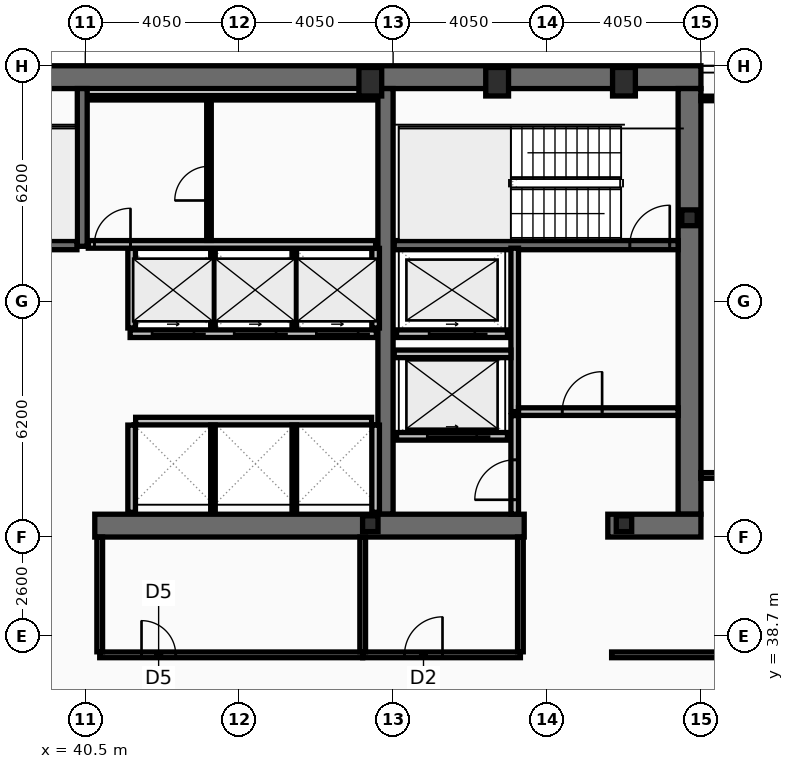
"""IFC4 building model, lengths in metres.
Left out: names, types, materials, properties, quantities, classifications, styles, units other than length and angle.
Written with IfcOpenShell. Run it as: python <this file> out.ifc"""

import sys

from ifc_helpers import new_model, si_unit, direction, frame, frame_2d, origin, origin_2d, place, context, subcontext, project, spatial, rectangle, hollow_rectangle, i_section, extrude, element, fill, save


model = new_model("IFC4")
c1 = context("Model", 3, precision=1e-05, world=origin(), true_north=direction((0.0, 1.0)))
c2 = subcontext(c1, "Body", "Model", "MODEL_VIEW")
j1 = project(units=[si_unit("LENGTHUNIT", "METRE"), si_unit("PLANEANGLEUNIT", "RADIAN")], contexts=[c1])
p1 = place(None, origin())
s1 = spatial("IfcSite", under=j1, at=p1, CompositionType="ELEMENT")
p2 = place(p1, origin())
s2 = spatial("IfcBuilding", under=s1, at=p2, CompositionType="ELEMENT")
p3 = place(p2, frame((0.0, 0.0, 224.6)))
s3 = spatial("IfcBuildingStorey", under=s2, at=p3, CompositionType="ELEMENT", Elevation=224.6)
p4 = place(p3, frame((16.2, 53.4, 0.0), z_axis=(0.0, 0.0, 1.0), x_axis=(1.0, 0.0, 0.0)))
e1 = element("IfcWall", 1, at=p4, inside=s3, PredefinedType="SHEAR", context=c2, shape_type="SweptSolid", body=[
    extrude(rectangle(XDim=40.5, YDim=0.6, at=frame_2d((20.25, 0.0))), origin(), (0.0, 0.0, 1.0), 3.44),
])
p5 = place(p3, frame((56.4, 53.1, 0.0), z_axis=(0.0, 0.0, 1.0), x_axis=(0.0, -1.0, 0.0)))
e2 = element("IfcWall", 2, at=p5, inside=s3, PredefinedType="SHEAR", context=c2, shape_type="SweptSolid", body=[
    extrude(rectangle(XDim=11.2, YDim=0.6, at=frame_2d((5.6, 0.0))), origin(), (0.0, 0.0, 1.0), 3.44),
])
p6 = place(p3, frame((48.4, 41.9, 0.0), z_axis=(0.0, 0.0, 1.0), x_axis=(0.0, 1.0, 0.0)))
e3 = element("IfcWall", 3, at=p6, inside=s3, PredefinedType="SHEAR", context=c2, shape_type="SweptSolid", body=[
    extrude(rectangle(XDim=11.2, YDim=0.4, at=frame_2d((5.6, 0.0))), origin(), (0.0, 0.0, 1.0), 3.44),
])
p7 = place(p3, frame((52.05, 41.6, 0.0), z_axis=(0.0, 0.0, 1.0), x_axis=(-1.0, 0.0, 0.0)))
e4 = element("IfcWall", 4, at=p7, inside=s3, PredefinedType="SHEAR", context=c2, shape_type="SweptSolid", body=[
    extrude(rectangle(XDim=11.3, YDim=0.6, at=frame_2d((5.65, 0.0))), origin(), (0.0, 0.0, 1.0), 3.44),
])
p8 = place(p3, frame((56.7, 41.6, 0.0), z_axis=(0.0, 0.0, 1.0), x_axis=(-1.0, 0.0, 0.0)))
e5 = element("IfcWall", 5, at=p8, inside=s3, PredefinedType="SHEAR", context=c2, shape_type="SweptSolid", body=[
    extrude(rectangle(XDim=2.45, YDim=0.6, at=frame_2d((1.225, 0.0))), origin(), (0.0, 0.0, 1.0), 3.44),
])
p9 = place(p3, frame((40.42, 48.95, 0.0), z_axis=(0.0, 0.0, 1.0), x_axis=(0.0, 1.0, 0.0)))
e6 = element("IfcWall", 6, at=p9, inside=s3, PredefinedType="SHEAR", context=c2, shape_type="SweptSolid", body=[
    extrude(rectangle(XDim=4.15, YDim=0.26, at=frame_2d((2.075, 0.0))), origin(), (0.0, 0.0, 1.0), 3.44),
])
p10 = place(p3, frame((48.63, 48.98, 0.0), z_axis=(0.0, 0.0, 1.0), x_axis=(1.0, 0.0, 0.0)))
e7 = element("IfcWall", 7, at=p10, inside=s3, PredefinedType="SHEAR", context=c2, shape_type="SweptSolid", body=[
    extrude(rectangle(XDim=7.47, YDim=0.24, at=frame_2d((3.735, 0.0))), origin(), (0.0, 0.0, 1.0), 3.44),
])
p11 = place(p10, frame((6.2, 0.0, 0.0)))
e8 = element("IfcOpeningElement", 8, at=p11, cuts=e7, PredefinedType="OPENING", context=c2, shape_type="SweptSolid", body=[
    extrude(rectangle(XDim=1.05, YDim=2.15, at=frame_2d((0.525, 1.075))), frame((0.0, 0.13, 0.0), z_axis=(0.0, -1.0, 0.0), x_axis=(1.0, 0.0, 0.0)), (0.0, 0.0, 1.0), 0.26),
])
p12 = place(p3, frame((32.72, 48.98, 0.0), z_axis=(0.0, 0.0, 1.0), x_axis=(1.0, 0.0, 0.0)))
e9 = element("IfcWall", 9, at=p12, inside=s3, PredefinedType="SHEAR", context=c2, shape_type="SweptSolid", body=[
    extrude(rectangle(XDim=7.56, YDim=0.24, at=frame_2d((3.78, 0.0))), origin(), (0.0, 0.0, 1.0), 3.44),
])
p13 = place(p12, frame((0.22, 0.0, 0.0)))
e10 = element("IfcOpeningElement", 10, at=p13, cuts=e9, PredefinedType="OPENING", context=c2, shape_type="SweptSolid", body=[
    extrude(rectangle(XDim=1.05, YDim=2.15, at=frame_2d((0.525, 1.075))), frame((0.0, 0.13, 0.0), z_axis=(0.0, -1.0, 0.0), x_axis=(1.0, 0.0, 0.0)), (0.0, 0.0, 1.0), 0.26),
])
for number, where, z_axis, x_axis in (
    (11, (48.0, 53.28, 0.0), (0.0, 0.0, 1.0), (1.0, 0.0, 0.0)),
    (12, (51.337, 53.28, 0.0), (0.0, 0.0, 1.0), (1.0, 0.0, 0.0)),
    (13, (54.675, 53.28, 0.0), (0.0, 0.0, 1.0), (1.0, 0.0, 0.0)),
):
    element("IfcColumn", number, at=place(p3, frame(where, z_axis=z_axis, x_axis=x_axis)), inside=s3, PredefinedType="COLUMN", context=c2, shape_type="SweptSolid", body=[
        extrude(hollow_rectangle(XDim=0.6, YDim=0.75, WallThickness=0.045, at=origin_2d()), origin(), (0.0, 0.0, 1.0), 3.6),
    ])
for number, where, z_axis, x_axis in (
    (14, (56.4, 49.7, 0.0), (0.0, 0.0, 1.0), (1.0, 0.0, 0.0)),
    (15, (48.0, 41.65, 0.0), (0.0, 0.0, 1.0), (1.0, 0.0, 0.0)),
    (16, (54.675, 41.65, 0.0), (0.0, 0.0, 1.0), (1.0, 0.0, 0.0)),
):
    element("IfcColumn", number, at=place(p3, frame(where, z_axis=z_axis, x_axis=x_axis)), inside=s3, PredefinedType="COLUMN", context=c2, shape_type="SweptSolid", body=[
        extrude(i_section(OverallWidth=0.406, OverallDepth=0.416, WebThickness=0.03, FlangeThickness=0.048, at=origin_2d()), origin(), (0.0, 0.0, 1.0), 3.6),
    ])
p14 = place(p3, frame((51.61, 43.95, 0.0), z_axis=(0.0, 0.0, 1.0), x_axis=(-1.0, 0.0, 0.0)))
e17 = element("IfcWall", 17, at=p14, inside=s3, PredefinedType="PARTITIONING", context=c2, shape_type="SweptSolid", body=[
    extrude(rectangle(XDim=2.92, YDim=0.2, at=frame_2d((1.46, 0.0))), origin(), (0.0, 0.0, 1.0), 3.44),
])
p15 = place(p14, frame((0.81, 0.0, 0.0)))
e18 = element("IfcOpeningElement", 18, at=p15, cuts=e17, PredefinedType="OPENING", context=c2, shape_type="SweptSolid", body=[
    extrude(rectangle(XDim=1.3, YDim=2.18, at=frame_2d((0.65, 1.09))), frame((0.0, 0.11, 0.0), z_axis=(0.0, -1.0, 0.0), x_axis=(1.0, 0.0, 0.0)), (0.0, 0.0, 1.0), 0.22),
])
p16 = place(p3, frame((51.61, 46.65, 0.0), z_axis=(0.0, 0.0, 1.0), x_axis=(-1.0, 0.0, 0.0)))
e19 = element("IfcWall", 19, at=p16, inside=s3, PredefinedType="PARTITIONING", context=c2, shape_type="SweptSolid", body=[
    extrude(rectangle(XDim=2.92, YDim=0.2, at=frame_2d((1.46, 0.0))), origin(), (0.0, 0.0, 1.0), 3.44),
])
p17 = place(p16, frame((0.86, 0.0, 0.0)))
e20 = element("IfcOpeningElement", 20, at=p17, cuts=e19, PredefinedType="OPENING", context=c2, shape_type="SweptSolid", body=[
    extrude(rectangle(XDim=1.2, YDim=2.18, at=frame_2d((0.6, 1.09))), frame((0.0, 0.11, 0.0), z_axis=(0.0, -1.0, 0.0), x_axis=(1.0, 0.0, 0.0)), (0.0, 0.0, 1.0), 0.22),
])
p18 = place(p3, frame((48.16, 46.65, 0.0), z_axis=(0.0, 0.0, 1.0), x_axis=(-1.0, 0.0, 0.0)))
e21 = element("IfcWall", 21, at=p18, inside=s3, PredefinedType="PARTITIONING", context=c2, shape_type="SweptSolid", body=[
    extrude(rectangle(XDim=6.48, YDim=0.2, at=frame_2d((3.24, 0.0))), origin(), (0.0, 0.0, 1.0), 3.44),
])
p19 = place(p18, frame((4.8, 0.0, 0.0)))
e22 = element("IfcOpeningElement", 22, at=p19, cuts=e21, PredefinedType="OPENING", context=c2, shape_type="SweptSolid", body=[
    extrude(rectangle(XDim=1.1, YDim=2.18, at=frame_2d((0.55, 1.09))), frame((0.0, 0.11, 0.0), z_axis=(0.0, -1.0, 0.0), x_axis=(1.0, 0.0, 0.0)), (0.0, 0.0, 1.0), 0.22),
])
p20 = place(p18, frame((2.64, 0.0, 0.0)))
e23 = element("IfcOpeningElement", 23, at=p20, cuts=e21, PredefinedType="OPENING", context=c2, shape_type="SweptSolid", body=[
    extrude(rectangle(XDim=1.1, YDim=2.18, at=frame_2d((0.55, 1.09))), frame((0.0, 0.11, 0.0), z_axis=(0.0, -1.0, 0.0), x_axis=(1.0, 0.0, 0.0)), (0.0, 0.0, 1.0), 0.22),
])
p21 = place(p18, frame((0.48, 0.0, 0.0)))
e24 = element("IfcOpeningElement", 24, at=p21, cuts=e21, PredefinedType="OPENING", context=c2, shape_type="SweptSolid", body=[
    extrude(rectangle(XDim=1.1, YDim=2.18, at=frame_2d((0.55, 1.09))), frame((0.0, 0.11, 0.0), z_axis=(0.0, -1.0, 0.0), x_axis=(1.0, 0.0, 0.0)), (0.0, 0.0, 1.0), 0.22),
])
p22 = place(p3, frame((51.8, 44.6, 0.0), z_axis=(0.0, 0.0, 1.0), x_axis=(0.0, 1.0, 0.0)))
e25 = element("IfcWall", 25, at=p22, inside=s3, PredefinedType="PARTITIONING", context=c2, shape_type="SweptSolid", body=[
    extrude(rectangle(XDim=4.3, YDim=0.2, at=frame_2d((2.15, 0.0))), origin(), (0.0, 0.0, 1.0), 3.44),
])
p23 = place(p3, frame((51.9, 44.6, 0.0), z_axis=(0.0, 0.0, 1.0), x_axis=(1.0, 0.0, 0.0)))
e26 = element("IfcWall", 26, at=p23, inside=s3, PredefinedType="PARTITIONING", context=c2, shape_type="SweptSolid", body=[
    extrude(rectangle(XDim=4.2, YDim=0.2, at=frame_2d((2.1, 0.0))), origin(), (0.0, 0.0, 1.0), 3.44),
])
p24 = place(p23, frame((1.15, 0.0, 0.0)))
e27 = element("IfcOpeningElement", 27, at=p24, cuts=e26, PredefinedType="OPENING", context=c2, shape_type="SweptSolid", body=[
    extrude(rectangle(XDim=1.05, YDim=2.15, at=frame_2d((0.525, 1.075))), frame((0.0, 0.11, 0.0), z_axis=(0.0, -1.0, 0.0), x_axis=(1.0, 0.0, 0.0)), (0.0, 0.0, 1.0), 0.22),
])
p25 = place(p3, frame((48.63, 46.12, 0.0), z_axis=(0.0, 0.0, 1.0), x_axis=(1.0, 0.0, 0.0)))
e28 = element("IfcWall", 28, at=p25, inside=s3, PredefinedType="PARTITIONING", context=c2, shape_type="SweptSolid", body=[
    extrude(rectangle(XDim=3.07, YDim=0.2, at=frame_2d((1.535, 0.0))), origin(), (0.0, 0.0, 1.0), 3.44),
])
p26 = place(p3, frame((51.8, 41.9, 0.0), z_axis=(0.0, 0.0, 1.0), x_axis=(0.0, 1.0, 0.0)))
e29 = element("IfcWall", 29, at=p26, inside=s3, PredefinedType="PARTITIONING", context=c2, shape_type="SweptSolid", body=[
    extrude(rectangle(XDim=2.595, YDim=0.2, at=frame_2d((1.298, 0.0))), origin(), (0.0, 0.0, 1.0), 3.44),
])
p27 = place(p26, frame((0.38, 0.0, 0.0)))
e30 = element("IfcOpeningElement", 30, at=p27, cuts=e29, PredefinedType="OPENING", context=c2, shape_type="SweptSolid", body=[
    extrude(rectangle(XDim=1.05, YDim=2.15, at=frame_2d((0.525, 1.075))), frame((0.0, 0.11, 0.0), z_axis=(0.0, -1.0, 0.0), x_axis=(1.0, 0.0, 0.0)), (0.0, 0.0, 1.0), 0.22),
])
for number, where, z_axis, x_axis in (
    (31, (41.72, 46.8, 0.0), (0.0, 0.0, 1.0), (0.0, 1.0, 0.0)),
    (32, (48.14, 46.8, 0.0), (0.0, 0.0, 1.0), (0.0, 1.0, 0.0)),
):
    element("IfcWall", number, at=place(p3, frame(where, z_axis=z_axis, x_axis=x_axis)), inside=s3, PredefinedType="PARTITIONING", context=c2, shape_type="SweptSolid", body=[
        extrude(rectangle(XDim=2.095, YDim=0.2, at=frame_2d((1.047, 0.0))), origin(), (0.0, 0.0, 1.0), 3.44),
    ])
for number, where, z_axis, x_axis in (
    (33, (43.86, 46.8, 0.0), (0.0, 0.0, 1.0), (0.0, 1.0, 0.0)),
    (34, (46.0, 46.8, 0.0), (0.0, 0.0, 1.0), (0.0, 1.0, 0.0)),
):
    element("IfcWall", number, at=place(p3, frame(where, z_axis=z_axis, x_axis=x_axis)), inside=s3, PredefinedType="PARTITIONING", context=c2, shape_type="SweptSolid", body=[
        extrude(rectangle(XDim=2.095, YDim=0.12, at=frame_2d((1.047, 0.0))), origin(), (0.0, 0.0, 1.0), 3.44),
    ])
p28 = place(p3, frame((41.825, 44.35, 0.0), z_axis=(0.0, 0.0, 1.0), x_axis=(1.0, 0.0, 0.0)))
e35 = element("IfcWall", 35, at=p28, inside=s3, PredefinedType="PARTITIONING", context=c2, shape_type="SweptSolid", body=[
    extrude(rectangle(XDim=6.21, YDim=0.2, at=frame_2d((3.105, 0.0))), origin(), (0.0, 0.0, 1.0), 3.44),
])
for number, where, z_axis, x_axis in (
    (36, (41.72, 41.95, 0.0), (0.0, 0.0, 1.0), (0.0, 1.0, 0.0)),
    (37, (48.14, 41.95, 0.0), (0.0, 0.0, 1.0), (0.0, 1.0, 0.0)),
):
    element("IfcWall", number, at=place(p3, frame(where, z_axis=z_axis, x_axis=x_axis)), inside=s3, PredefinedType="PARTITIONING", context=c2, shape_type="SweptSolid", body=[
        extrude(rectangle(XDim=2.295, YDim=0.2, at=frame_2d((1.147, 0.0))), origin(), (0.0, 0.0, 1.0), 3.44),
    ])
for number, where, z_axis, x_axis in (
    (38, (43.86, 41.95, 0.0), (0.0, 0.0, 1.0), (0.0, 1.0, 0.0)),
    (39, (46.0, 41.95, 0.0), (0.0, 0.0, 1.0), (0.0, 1.0, 0.0)),
):
    element("IfcWall", number, at=place(p3, frame(where, z_axis=z_axis, x_axis=x_axis)), inside=s3, PredefinedType="PARTITIONING", context=c2, shape_type="SweptSolid", body=[
        extrude(rectangle(XDim=2.295, YDim=0.12, at=frame_2d((1.147, 0.0))), origin(), (0.0, 0.0, 1.0), 3.44),
    ])
p29 = place(p3, frame((40.58, 52.86, 0.0), z_axis=(0.0, 0.0, 1.0), x_axis=(1.0, 0.0, 0.0)))
e40 = element("IfcWall", 40, at=p29, inside=s3, PredefinedType="PARTITIONING", context=c2, shape_type="SweptSolid", body=[
    extrude(rectangle(XDim=7.56, YDim=0.12, at=frame_2d((3.78, 0.0))), origin(), (0.0, 0.0, 1.0), 3.44),
])
p30 = place(p3, frame((40.58, 49.0, 0.0), z_axis=(0.0, 0.0, 1.0), x_axis=(1.0, 0.0, 0.0)))
e41 = element("IfcWall", 41, at=p30, inside=s3, PredefinedType="PARTITIONING", context=c2, shape_type="SweptSolid", body=[
    extrude(rectangle(XDim=7.56, YDim=0.2, at=frame_2d((3.78, 0.0))), origin(), (0.0, 0.0, 1.0), 3.44),
])
p31 = place(p30, frame((0.16, 0.0, 0.0)))
e42 = element("IfcOpeningElement", 42, at=p31, cuts=e41, PredefinedType="OPENING", context=c2, shape_type="SweptSolid", body=[
    extrude(rectangle(XDim=0.95, YDim=2.1, at=frame_2d((0.475, 1.05))), frame((0.0, 0.11, 0.0), z_axis=(0.0, -1.0, 0.0), x_axis=(1.0, 0.0, 0.0)), (0.0, 0.0, 1.0), 0.22),
])
p32 = place(p3, frame((43.755, 49.105, 0.0), z_axis=(0.0, 0.0, 1.0), x_axis=(0.0, 1.0, 0.0)))
e43 = element("IfcWall", 43, at=p32, inside=s3, PredefinedType="PARTITIONING", context=c2, shape_type="SweptSolid", body=[
    extrude(rectangle(XDim=3.69, YDim=0.12, at=frame_2d((1.845, 0.0))), origin(), (0.0, 0.0, 1.0), 3.44),
])
p33 = place(p32, frame((1.05, 0.0, 0.0)))
e44 = element("IfcOpeningElement", 44, at=p33, cuts=e43, PredefinedType="OPENING", context=c2, shape_type="SweptSolid", body=[
    extrude(rectangle(XDim=0.9, YDim=2.05, at=frame_2d((0.45, 1.025))), frame((0.0, 0.07, 0.0), z_axis=(0.0, -1.0, 0.0), x_axis=(1.0, 0.0, 0.0)), (0.0, 0.0, 1.0), 0.14),
])
p34 = place(p3, frame((40.88, 38.2, 0.0), z_axis=(0.0, 0.0, 1.0), x_axis=(1.0, 0.0, 0.0)))
e45 = element("IfcWall", 45, at=p34, inside=s3, PredefinedType="PARTITIONING", context=c2, shape_type="SweptSolid", body=[
    extrude(rectangle(XDim=6.92, YDim=0.15, at=frame_2d((3.46, 0.0))), origin(), (0.0, 0.0, 1.0), 2.78),
])
p35 = place(p34, frame((1.1, 0.0, 0.0)))
e46 = element("IfcOpeningElement", 46, at=p35, cuts=e45, PredefinedType="OPENING", context=c2, shape_type="SweptSolid", body=[
    extrude(rectangle(XDim=0.9, YDim=2.05, at=frame_2d((0.45, 1.025))), frame((0.0, 0.085, 0.0), z_axis=(0.0, -1.0, 0.0), x_axis=(1.0, 0.0, 0.0)), (0.0, 0.0, 1.0), 0.17),
])
p36 = place(p3, frame((47.8, 38.2, 0.0), z_axis=(0.0, 0.0, 1.0), x_axis=(1.0, 0.0, 0.0)))
e47 = element("IfcWall", 47, at=p36, inside=s3, PredefinedType="PARTITIONING", context=c2, shape_type="SweptSolid", body=[
    extrude(rectangle(XDim=4.15, YDim=0.15, at=frame_2d((2.075, 0.0))), origin(), (0.0, 0.0, 1.0), 2.78),
])
p37 = place(p36, frame((1.1, 0.0, 0.0)))
e48 = element("IfcOpeningElement", 48, at=p37, cuts=e47, PredefinedType="OPENING", context=c2, shape_type="SweptSolid", body=[
    extrude(rectangle(XDim=1.0, YDim=2.05, at=frame_2d((0.5, 1.025))), frame((0.0, 0.085, 0.0), z_axis=(0.0, -1.0, 0.0), x_axis=(1.0, 0.0, 0.0)), (0.0, 0.0, 1.0), 0.17),
])
p38 = place(p3, frame((40.88, 38.28, 0.0), z_axis=(0.0, 0.0, 1.0), x_axis=(0.0, 1.0, 0.0)))
e49 = element("IfcWall", 49, at=p38, inside=s3, PredefinedType="PARTITIONING", context=c2, shape_type="SweptSolid", body=[
    extrude(rectangle(XDim=3.02, YDim=0.15, at=frame_2d((1.51, 0.0))), origin(), (0.0, 0.0, 1.0), 3.44),
])
p39 = place(p3, frame((47.8, 38.28, 0.0), z_axis=(0.0, 0.0, 1.0), x_axis=(0.0, 1.0, 0.0)))
e50 = element("IfcWall", 50, at=p39, inside=s3, PredefinedType="PARTITIONING", context=c2, shape_type="SweptSolid", body=[
    extrude(rectangle(XDim=3.02, YDim=0.15, at=frame_2d((1.51, 0.0))), origin(), (0.0, 0.0, 1.0), 2.78),
])
p40 = place(p3, frame((51.95, 38.28, 0.0), z_axis=(0.0, 0.0, 1.0), x_axis=(0.0, 1.0, 0.0)))
e51 = element("IfcWall", 51, at=p40, inside=s3, PredefinedType="PARTITIONING", context=c2, shape_type="SweptSolid", body=[
    extrude(rectangle(XDim=3.02, YDim=0.15, at=frame_2d((1.51, 0.0))), origin(), (0.0, 0.0, 1.0), 3.44),
])
p41 = place(p3, frame((54.35, 38.2, 0.0), z_axis=(0.0, 0.0, 1.0), x_axis=(1.0, 0.0, 0.0)))
e52 = element("IfcWall", 52, at=p41, inside=s3, PredefinedType="PARTITIONING", context=c2, shape_type="SweptSolid", body=[
    extrude(rectangle(XDim=10.52, YDim=0.15, at=frame_2d((5.26, 0.0))), origin(), (0.0, 0.0, 1.0), 2.78),
])
p42 = place(p41, frame((3.25, 0.0, 0.0)))
e53 = element("IfcOpeningElement", 53, at=p42, cuts=e52, PredefinedType="OPENING", context=c2, shape_type="SweptSolid", body=[
    extrude(rectangle(XDim=0.95, YDim=2.05, at=frame_2d((0.475, 1.025))), frame((0.0, 0.085, 0.0), z_axis=(0.0, -1.0, 0.0), x_axis=(1.0, 0.0, 0.0)), (0.0, 0.0, 1.0), 0.17),
])
p43 = place(p3, frame((56.7, 42.92, 0.0), z_axis=(0.0, 0.0, 1.0), x_axis=(1.0, 0.0, 0.0)))
e54 = element("IfcWall", 54, at=p43, inside=s3, PredefinedType="PARTITIONING", context=c2, shape_type="SweptSolid", body=[
    extrude(rectangle(XDim=8.105, YDim=0.15, at=frame_2d((4.052, 0.0))), origin(), (0.0, 0.0, 1.0), 2.78),
])
p44 = place(p43, frame((0.9, 0.0, 0.0)))
e55 = element("IfcOpeningElement", 55, at=p44, cuts=e54, PredefinedType="OPENING", context=c2, shape_type="SweptSolid", body=[
    extrude(rectangle(XDim=0.9, YDim=2.05, at=frame_2d((0.45, 1.025))), frame((0.0, 0.085, 0.0), z_axis=(0.0, -1.0, 0.0), x_axis=(1.0, 0.0, 0.0)), (0.0, 0.0, 1.0), 0.17),
])
p45 = place(p3, frame((56.7, 52.84, 0.0), z_axis=(0.0, 0.0, 1.0), x_axis=(1.0, 0.0, 0.0)))
e56 = element("IfcWall", 56, at=p45, inside=s3, PredefinedType="PARTITIONING", context=c2, shape_type="SweptSolid", body=[
    extrude(rectangle(XDim=8.105, YDim=0.12, at=frame_2d((4.052, 0.0))), origin(), (0.0, 0.0, 1.0), 3.44),
])
p46 = place(p11, origin())
e57 = element("IfcDoor", 57, at=p46, inside=s3, OperationType="SINGLE_SWING_RIGHT", PredefinedType="DOOR", context=c2, shape_type="SweptSolid", body=[
    extrude(rectangle(XDim=1.05, YDim=2.15, at=frame_2d((0.525, 1.075))), frame((0.0, 0.025, 0.0), z_axis=(0.0, -1.0, 0.0), x_axis=(1.0, 0.0, 0.0)), (0.0, 0.0, 1.0), 0.05),
])
fill(e8, e57)
p47 = place(p15, origin())
e58 = element("IfcDoor", 58, at=p47, inside=s3, OperationType="SLIDING_TO_LEFT", PredefinedType="DOOR", context=c2, shape_type="SweptSolid", body=[
    extrude(rectangle(XDim=1.3, YDim=2.18, at=frame_2d((0.65, 1.09))), frame((0.0, 0.025, 0.0), z_axis=(0.0, -1.0, 0.0), x_axis=(1.0, 0.0, 0.0)), (0.0, 0.0, 1.0), 0.05),
])
fill(e18, e58)
p48 = place(p17, origin())
e59 = element("IfcDoor", 59, at=p48, inside=s3, OperationType="SLIDING_TO_LEFT", PredefinedType="DOOR", context=c2, shape_type="SweptSolid", body=[
    extrude(rectangle(XDim=1.2, YDim=2.18, at=frame_2d((0.6, 1.09))), frame((0.0, 0.025, 0.0), z_axis=(0.0, -1.0, 0.0), x_axis=(1.0, 0.0, 0.0)), (0.0, 0.0, 1.0), 0.05),
])
fill(e20, e59)
p49 = place(p19, origin())
e60 = element("IfcDoor", 60, at=p49, inside=s3, OperationType="SLIDING_TO_LEFT", PredefinedType="DOOR", context=c2, shape_type="SweptSolid", body=[
    extrude(rectangle(XDim=1.1, YDim=2.18, at=frame_2d((0.55, 1.09))), frame((0.0, 0.025, 0.0), z_axis=(0.0, -1.0, 0.0), x_axis=(1.0, 0.0, 0.0)), (0.0, 0.0, 1.0), 0.05),
])
fill(e22, e60)
p50 = place(p20, origin())
e61 = element("IfcDoor", 61, at=p50, inside=s3, OperationType="SLIDING_TO_LEFT", PredefinedType="DOOR", context=c2, shape_type="SweptSolid", body=[
    extrude(rectangle(XDim=1.1, YDim=2.18, at=frame_2d((0.55, 1.09))), frame((0.0, 0.025, 0.0), z_axis=(0.0, -1.0, 0.0), x_axis=(1.0, 0.0, 0.0)), (0.0, 0.0, 1.0), 0.05),
])
fill(e23, e61)
p51 = place(p21, origin())
e62 = element("IfcDoor", 62, at=p51, inside=s3, OperationType="SLIDING_TO_LEFT", PredefinedType="DOOR", context=c2, shape_type="SweptSolid", body=[
    extrude(rectangle(XDim=1.1, YDim=2.18, at=frame_2d((0.55, 1.09))), frame((0.0, 0.025, 0.0), z_axis=(0.0, -1.0, 0.0), x_axis=(1.0, 0.0, 0.0)), (0.0, 0.0, 1.0), 0.05),
])
fill(e24, e62)
p52 = place(p24, origin())
e63 = element("IfcDoor", 63, at=p52, inside=s3, OperationType="SINGLE_SWING_RIGHT", PredefinedType="DOOR", context=c2, shape_type="SweptSolid", body=[
    extrude(rectangle(XDim=1.05, YDim=2.15, at=frame_2d((0.525, 1.075))), frame((0.0, 0.025, 0.0), z_axis=(0.0, -1.0, 0.0), x_axis=(1.0, 0.0, 0.0)), (0.0, 0.0, 1.0), 0.05),
])
fill(e27, e63)
p53 = place(p27, origin())
e64 = element("IfcDoor", 64, at=p53, inside=s3, OperationType="SINGLE_SWING_LEFT", PredefinedType="DOOR", context=c2, shape_type="SweptSolid", body=[
    extrude(rectangle(XDim=1.05, YDim=2.15, at=frame_2d((0.525, 1.075))), frame((0.0, 0.025, 0.0), z_axis=(0.0, -1.0, 0.0), x_axis=(1.0, 0.0, 0.0)), (0.0, 0.0, 1.0), 0.05),
])
fill(e30, e64)
p54 = place(p31, origin())
e65 = element("IfcDoor", 65, at=p54, inside=s3, OperationType="SINGLE_SWING_RIGHT", PredefinedType="DOOR", context=c2, shape_type="SweptSolid", body=[
    extrude(rectangle(XDim=0.95, YDim=2.1, at=frame_2d((0.475, 1.05))), frame((0.0, 0.025, 0.0), z_axis=(0.0, -1.0, 0.0), x_axis=(1.0, 0.0, 0.0)), (0.0, 0.0, 1.0), 0.05),
])
fill(e42, e65)
p55 = place(p33, origin())
e66 = element("IfcDoor", 66, at=p55, inside=s3, OperationType="SINGLE_SWING_LEFT", PredefinedType="DOOR", context=c2, shape_type="SweptSolid", body=[
    extrude(rectangle(XDim=0.9, YDim=2.05, at=frame_2d((0.45, 1.025))), frame((0.0, 0.025, 0.0), z_axis=(0.0, -1.0, 0.0), x_axis=(1.0, 0.0, 0.0)), (0.0, 0.0, 1.0), 0.05),
])
fill(e44, e66)
p56 = place(p35, origin())
e67 = element("IfcDoor", 67, at=p56, inside=s3, OperationType="SINGLE_SWING_LEFT", PredefinedType="DOOR", context=c2, shape_type="SweptSolid", body=[
    extrude(rectangle(XDim=0.9, YDim=2.05, at=frame_2d((0.45, 1.025))), frame((0.0, 0.025, 0.0), z_axis=(0.0, -1.0, 0.0), x_axis=(1.0, 0.0, 0.0)), (0.0, 0.0, 1.0), 0.05),
])
fill(e46, e67)
p57 = place(p37, origin())
e68 = element("IfcDoor", 68, at=p57, inside=s3, OperationType="SINGLE_SWING_RIGHT", PredefinedType="DOOR", context=c2, shape_type="SweptSolid", body=[
    extrude(rectangle(XDim=1.0, YDim=2.05, at=frame_2d((0.5, 1.025))), frame((0.0, 0.025, 0.0), z_axis=(0.0, -1.0, 0.0), x_axis=(1.0, 0.0, 0.0)), (0.0, 0.0, 1.0), 0.05),
])
fill(e48, e68)
save(model, sys.argv[1])
